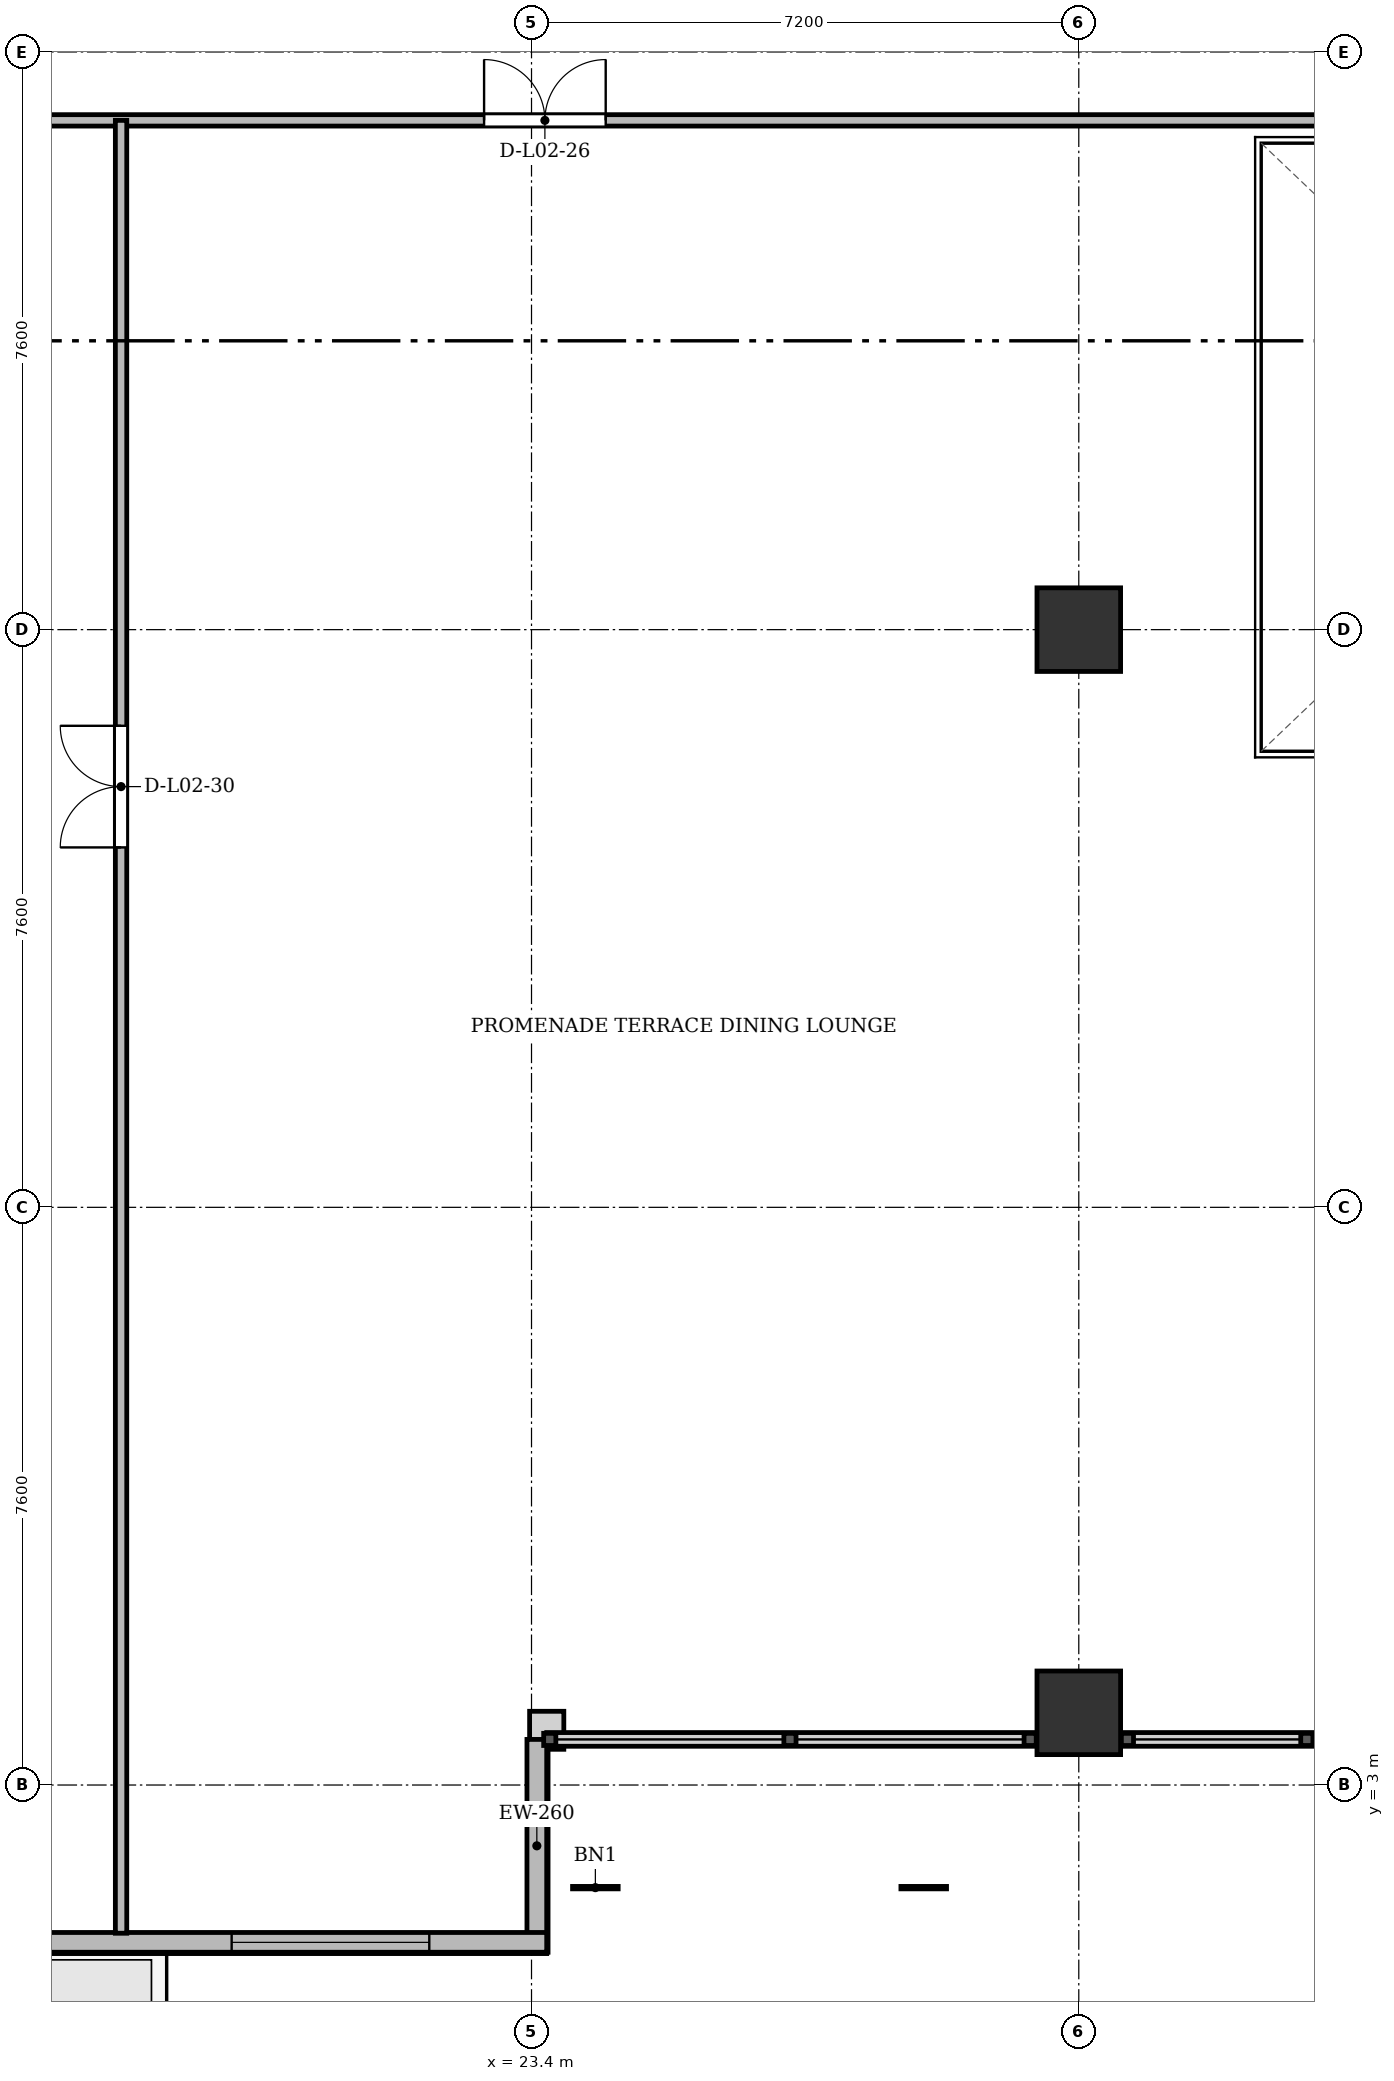
"""IFC4 building model, lengths in metres.
Left out: names, types, materials, properties, quantities, classifications, styles, units other than length and angle.
Written with IfcOpenShell. Run it as: python <this file> out.ifc"""

import sys

from ifc_helpers import new_model, si_unit, direction, frame, frame_2d, origin, origin_2d, place, context, subcontext, project, spatial, rectangle, extrude, source, transform, mapped, element, fill, save


model = new_model("IFC4")
c1 = context("Model", 3, precision=1e-05, world=origin(), true_north=direction((0.0, 1.0)))
c2 = subcontext(c1, "Body", "Model", "MODEL_VIEW")
j1 = project(units=[si_unit("LENGTHUNIT", "METRE"), si_unit("PLANEANGLEUNIT", "RADIAN")], contexts=[c1])
p1 = place(None, origin())
s1 = spatial("IfcSite", under=j1, at=p1, CompositionType="ELEMENT")
p2 = place(p1, origin())
s2 = spatial("IfcBuilding", under=s1, at=p2, CompositionType="ELEMENT")
p3 = place(p2, frame((0.0, 0.0, 9.7)))
s3 = spatial("IfcBuildingStorey", under=s2, at=p3, CompositionType="ELEMENT", Elevation=9.7)
m1 = source(origin(), c2, "Body", "SweptSolid", [
    extrude(rectangle(XDim=1.1, YDim=1.1, at=origin_2d()), origin(), (0.0, 0.0, 1.0), 4.5),
])
for number, where, z_axis, x_axis in (
    (1, (30.6, 3.95, 0.0), (0.0, 0.0, 1.0), (1.0, 0.0, 0.0)),
    (2, (30.6, 18.2, 0.0), (0.0, 0.0, 1.0), (1.0, 0.0, 0.0)),
):
    element("IfcColumn", number, at=place(p3, frame(where, z_axis=z_axis, x_axis=x_axis)), inside=s3, PredefinedType="COLUMN", context=c2, shape_type="MappedRepresentation", body=[
        mapped(m1, transform((0.0, 0.0, 0.0), x_axis=(1.0, 0.0, 0.0), y_axis=(0.0, 1.0, 0.0), z_axis=(0.0, 0.0, 1.0), scale=1.0)),
    ])
p4 = place(p3, frame((23.47, 3.6, 0.0), z_axis=(0.0, 0.0, 1.0), x_axis=(0.0, -1.0, 0.0)))
e3 = element("IfcWall", 3, at=p4, inside=s3, PredefinedType="SOLIDWALL", context=c2, shape_type="SweptSolid", body=[
    extrude(rectangle(XDim=2.8, YDim=0.26, at=frame_2d((1.4, 0.0))), origin(), (0.0, 0.0, 1.0), 4.2),
])
p5 = place(p3, frame((23.6, 0.93, 0.0), z_axis=(0.0, 0.0, 1.0), x_axis=(-1.0, 0.0, 0.0)))
e4 = element("IfcWall", 4, at=p5, inside=s3, PredefinedType="SOLIDWALL", context=c2, shape_type="SweptSolid", body=[
    extrude(rectangle(XDim=25.6, YDim=0.26, at=frame_2d((12.8, 0.0))), origin(), (0.0, 0.0, 1.0), 4.2),
])
p6 = place(p5, frame((1.545, 0.0, 0.9)))
e5 = element("IfcOpeningElement", 5, at=p6, cuts=e4, PredefinedType="OPENING", context=c2, shape_type="SweptSolid", body=[
    extrude(rectangle(XDim=2.6, YDim=1.9, at=frame_2d((1.3, 0.95))), frame((0.0, 0.14, 0.0), z_axis=(0.0, -1.0, 0.0), x_axis=(1.0, 0.0, 0.0)), (0.0, 0.0, 1.0), 0.28),
])
p7 = place(p5, frame((16.834, 0.0, 0.0)))
e6 = element("IfcOpeningElement", 6, at=p7, cuts=e4, PredefinedType="OPENING", context=c2, shape_type="SweptSolid", body=[
    extrude(rectangle(XDim=1.5, YDim=2.25, at=frame_2d((0.75, 1.125))), frame((0.0, 0.14, 0.0), z_axis=(0.0, -1.0, 0.0), x_axis=(1.0, 0.0, 0.0)), (0.0, 0.0, 1.0), 0.28),
])
p8 = place(p3, frame((-1.75, 24.9, 0.0), z_axis=(0.0, 0.0, 1.0), x_axis=(1.0, 0.0, 0.0)))
e7 = element("IfcWall", 7, at=p8, inside=s3, PredefinedType="PARTITIONING", context=c2, shape_type="SweptSolid", body=[
    extrude(rectangle(XDim=77.9, YDim=0.15, at=frame_2d((38.95, 0.0))), origin(), (0.0, 0.0, 1.0), 3.4),
])
p9 = place(p8, frame((2.679, 0.0, 0.0)))
e8 = element("IfcOpeningElement", 8, at=p9, cuts=e7, PredefinedType="OPENING", context=c2, shape_type="SweptSolid", body=[
    extrude(rectangle(XDim=1.6, YDim=2.2, at=frame_2d((0.8, 1.1))), frame((0.0, 0.085, 0.0), z_axis=(0.0, -1.0, 0.0), x_axis=(1.0, 0.0, 0.0)), (0.0, 0.0, 1.0), 0.17),
])
p10 = place(p8, frame((24.526, 0.0, 0.0)))
e9 = element("IfcOpeningElement", 9, at=p10, cuts=e7, PredefinedType="OPENING", context=c2, shape_type="SweptSolid", body=[
    extrude(rectangle(XDim=1.6, YDim=2.2, at=frame_2d((0.8, 1.1))), frame((0.0, 0.085, 0.0), z_axis=(0.0, -1.0, 0.0), x_axis=(1.0, 0.0, 0.0)), (0.0, 0.0, 1.0), 0.17),
])
p11 = place(p8, frame((50.963, 0.0, 0.0)))
e10 = element("IfcOpeningElement", 10, at=p11, cuts=e7, PredefinedType="OPENING", context=c2, shape_type="SweptSolid", body=[
    extrude(rectangle(XDim=1.6, YDim=2.2, at=frame_2d((0.8, 1.1))), frame((0.0, 0.085, 0.0), z_axis=(0.0, -1.0, 0.0), x_axis=(1.0, 0.0, 0.0)), (0.0, 0.0, 1.0), 0.17),
])
p12 = place(p8, frame((60.633, 0.0, 0.0)))
e11 = element("IfcOpeningElement", 11, at=p12, cuts=e7, PredefinedType="OPENING", context=c2, shape_type="SweptSolid", body=[
    extrude(rectangle(XDim=1.6, YDim=2.2, at=frame_2d((0.8, 1.1))), frame((0.0, 0.085, 0.0), z_axis=(0.0, -1.0, 0.0), x_axis=(1.0, 0.0, 0.0)), (0.0, 0.0, 1.0), 0.17),
])
p13 = place(p8, frame((74.888, 0.0, 0.0)))
e12 = element("IfcOpeningElement", 12, at=p13, cuts=e7, PredefinedType="OPENING", context=c2, shape_type="SweptSolid", body=[
    extrude(rectangle(XDim=1.6, YDim=2.2, at=frame_2d((0.8, 1.1))), frame((0.0, 0.085, 0.0), z_axis=(0.0, -1.0, 0.0), x_axis=(1.0, 0.0, 0.0)), (0.0, 0.0, 1.0), 0.17),
])
p14 = place(p3, frame((18.0, 1.05, 0.0), z_axis=(0.0, 0.0, 1.0), x_axis=(0.0, 1.0, 0.0)))
e13 = element("IfcWall", 13, at=p14, inside=s3, PredefinedType="PARTITIONING", context=c2, shape_type="SweptSolid", body=[
    extrude(rectangle(XDim=23.85, YDim=0.15, at=frame_2d((11.925, 0.0))), origin(), (0.0, 0.0, 1.0), 3.1),
])
p15 = place(p14, frame((14.285, 0.0, 0.0)))
e14 = element("IfcOpeningElement", 14, at=p15, cuts=e13, PredefinedType="OPENING", context=c2, shape_type="SweptSolid", body=[
    extrude(rectangle(XDim=1.6, YDim=2.2, at=frame_2d((0.8, 1.1))), frame((0.0, 0.085, 0.0), z_axis=(0.0, -1.0, 0.0), x_axis=(1.0, 0.0, 0.0)), (0.0, 0.0, 1.0), 0.17),
])
m2 = source(origin(), c2, "Body", "SweptSolid", [
    extrude(rectangle(XDim=2.6, YDim=1.9, at=frame_2d((1.3, 0.95))), frame((0.0, 0.03, 0.0), z_axis=(0.0, -1.0, 0.0), x_axis=(1.0, 0.0, 0.0)), (0.0, 0.0, 1.0), 0.06),
])
p16 = place(p6, origin())
e15 = element("IfcWindow", 15, at=p16, inside=s3, PartitioningType="SINGLE_PANEL", PredefinedType="WINDOW", context=c2, shape_type="MappedRepresentation", body=[
    mapped(m2, transform((0.0, 0.0, 0.0), x_axis=(1.0, 0.0, 0.0), y_axis=(0.0, 1.0, 0.0), z_axis=(0.0, 0.0, 1.0), scale=1.0)),
])
fill(e5, e15)
m3 = source(origin(), c2, "Body", "SweptSolid", [
    extrude(rectangle(XDim=1.6, YDim=2.2, at=frame_2d((0.8, 1.1))), frame((0.0, 0.025, 0.0), z_axis=(0.0, -1.0, 0.0), x_axis=(1.0, 0.0, 0.0)), (0.0, 0.0, 1.0), 0.05),
])
p17 = place(p10, origin())
e16 = element("IfcDoor", 16, at=p17, inside=s3, OperationType="DOUBLE_DOOR_SINGLE_SWING", PredefinedType="DOOR", context=c2, shape_type="MappedRepresentation", body=[
    mapped(m3, transform((0.0, 0.0, 0.0), x_axis=(1.0, 0.0, 0.0), y_axis=(0.0, 1.0, 0.0), z_axis=(0.0, 0.0, 1.0), scale=1.0)),
])
fill(e9, e16)
p18 = place(p15, origin())
e17 = element("IfcDoor", 17, at=p18, inside=s3, OperationType="DOUBLE_DOOR_SINGLE_SWING", PredefinedType="DOOR", context=c2, shape_type="MappedRepresentation", body=[
    mapped(m3, transform((0.0, 0.0, 0.0), x_axis=(1.0, 0.0, 0.0), y_axis=(0.0, 1.0, 0.0), z_axis=(0.0, 0.0, 1.0), scale=1.0)),
])
fill(e14, e17)
save(model, sys.argv[1])
